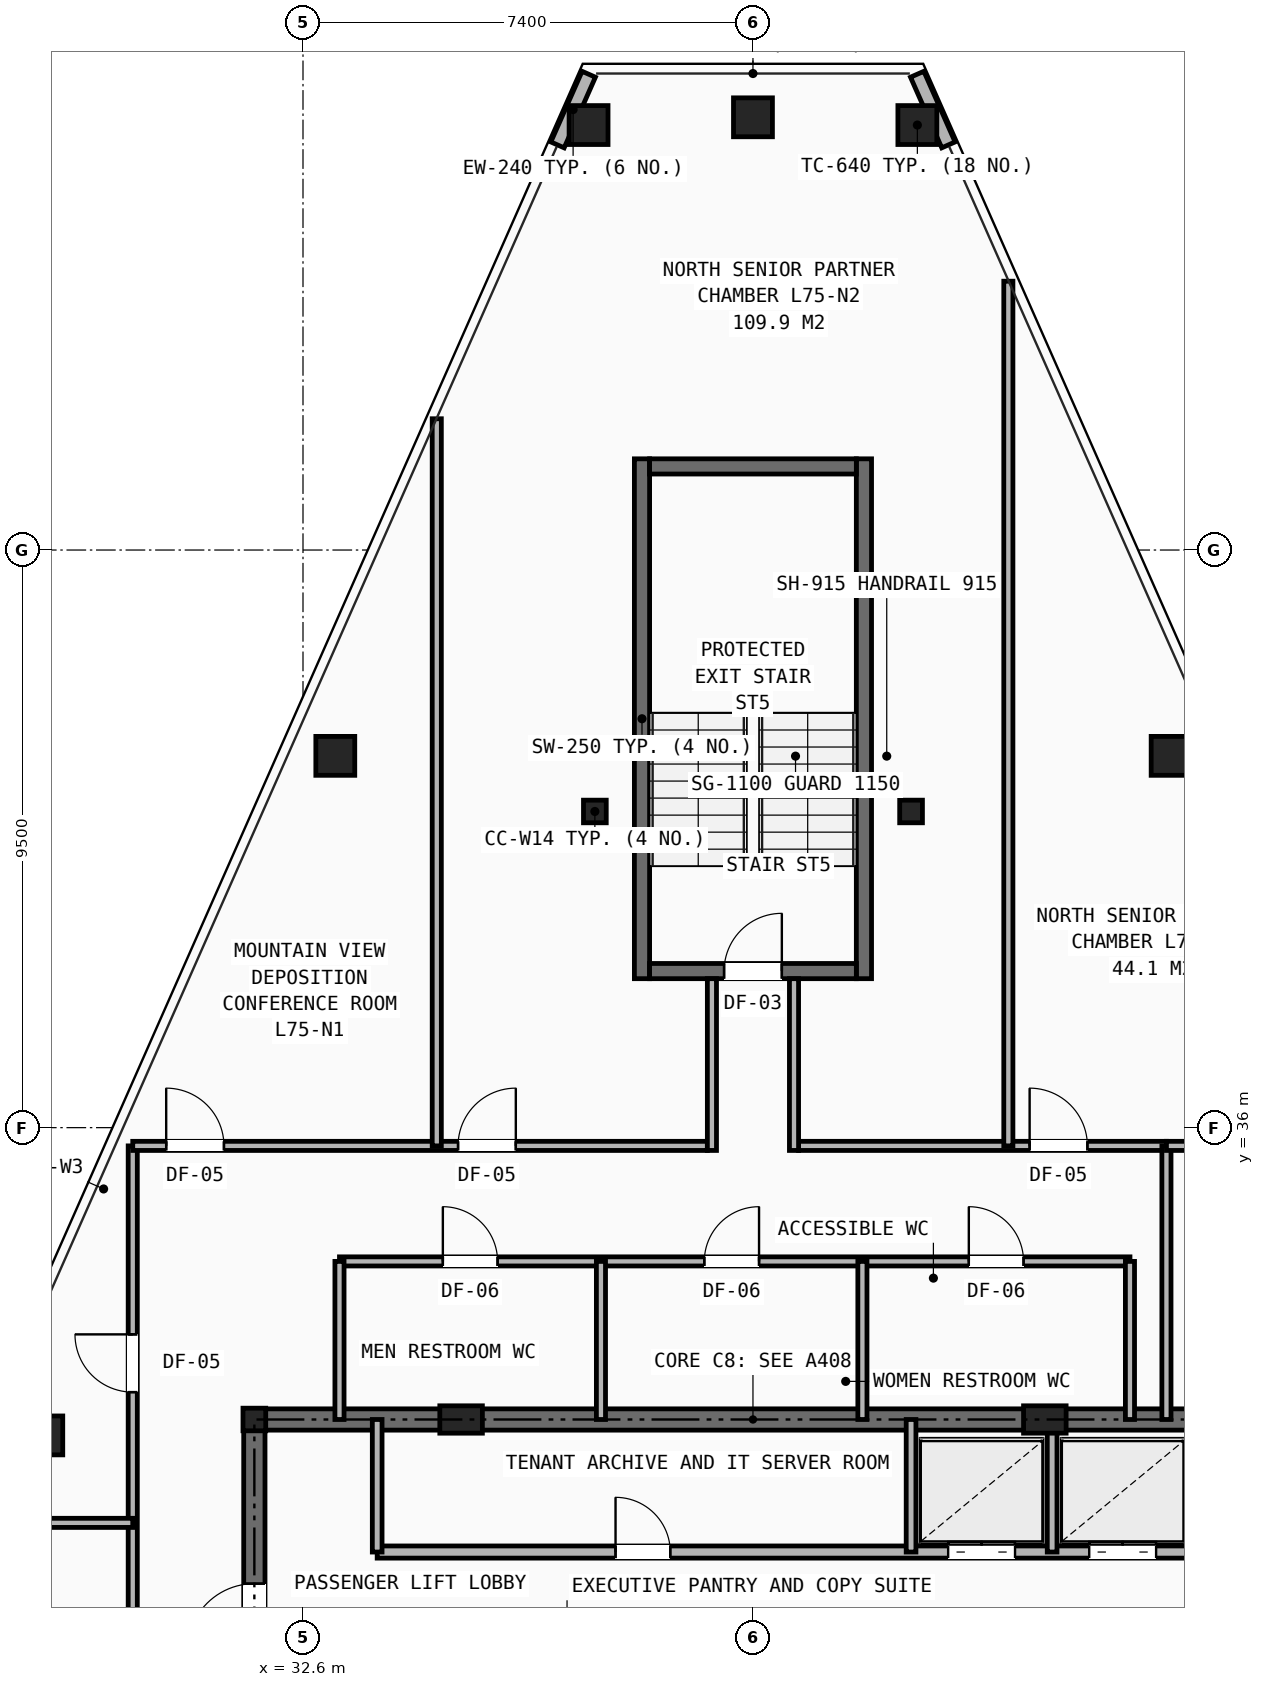
"""IFC4 building model, lengths in metres.
Left out: names, types, materials, properties, quantities, classifications, styles, units other than length and angle.
Written with IfcOpenShell. Run it as: python <this file> out.ifc"""

import sys

from ifc_helpers import new_model, si_unit, direction, frame, frame_2d, origin, origin_2d, place, context, subcontext, project, spatial, rectangle, hollow_rectangle, i_section, extrude, element, fill, save


model = new_model("IFC4")
c1 = context("Model", 3, precision=1e-05, world=origin(), true_north=direction((0.0, 1.0)))
c2 = subcontext(c1, "Body", "Model", "MODEL_VIEW")
j1 = project(units=[si_unit("LENGTHUNIT", "METRE"), si_unit("PLANEANGLEUNIT", "RADIAN")], contexts=[c1])
p1 = place(None, origin())
s1 = spatial("IfcSite", under=j1, at=p1, CompositionType="ELEMENT")
p2 = place(p1, origin())
s2 = spatial("IfcBuilding", under=s1, at=p2, CompositionType="ELEMENT")
p3 = place(p2, frame((0.0, 0.0, 265.5)))
s3 = spatial("IfcBuildingStorey", under=s2, at=p3, CompositionType="ELEMENT", Elevation=265.5)
for number, where, z_axis, x_axis in (
    (1, (31.8, 31.2, 0.0), (0.0, 0.0, 1.0), (1.0, 0.0, 0.0)),
    (2, (37.4, 41.2, 0.0), (0.0, 0.0, 1.0), (1.0, 0.0, 0.0)),
    (3, (42.6, 41.2, 0.0), (0.0, 0.0, 1.0), (1.0, 0.0, 0.0)),
):
    element("IfcColumn", number, at=place(p3, frame(where, z_axis=z_axis, x_axis=x_axis)), inside=s3, PredefinedType="COLUMN", context=c2, shape_type="SweptSolid", body=[
        extrude(i_section(OverallWidth=0.374, OverallDepth=0.372, WebThickness=0.016, FlangeThickness=0.026, at=origin_2d()), origin(), (0.0, 0.0, 1.0), 3.5),
    ])
for number, where, z_axis, x_axis in (
    (4, (35.2, 31.2, 0.0), (0.0, 0.0, 1.0), (1.0, 0.0, 0.0)),
    (5, (44.8, 31.2, 0.0), (0.0, 0.0, 1.0), (1.0, 0.0, 0.0)),
):
    element("IfcColumn", number, at=place(p3, frame(where, z_axis=z_axis, x_axis=x_axis)), inside=s3, PredefinedType="PILASTER", context=c2, shape_type="SweptSolid", body=[
        extrude(rectangle(XDim=0.7, YDim=0.45, at=origin_2d()), origin(), (0.0, 0.0, 1.0), 3.5),
    ])
for number, where, z_axis, x_axis in (
    (6, (42.704, 52.49, 0.0), (0.0, 0.0, 1.0), (1.0, 0.0, 0.0)),
    (7, (40.0, 52.617, 0.0), (0.0, 0.0, 1.0), (1.0, 0.0, 0.0)),
    (8, (37.296, 52.49, 0.0), (0.0, 0.0, 1.0), (1.0, 0.0, 0.0)),
    (9, (33.131, 42.115, 0.0), (0.0, 0.0, 1.0), (1.0, 0.0, 0.0)),
    (10, (28.329, 30.938, 0.0), (0.0, 0.0, 1.0), (1.0, 0.0, 0.0)),
    (11, (46.869, 42.115, 0.0), (0.0, 0.0, 1.0), (1.0, 0.0, 0.0)),
):
    element("IfcColumn", number, at=place(p3, frame(where, z_axis=z_axis, x_axis=x_axis)), inside=s3, PredefinedType="COLUMN", context=c2, shape_type="SweptSolid", body=[
        extrude(hollow_rectangle(XDim=0.64, YDim=0.64, WallThickness=0.045, at=origin_2d()), origin(), (0.0, 0.0, 1.0), 3.5),
    ])
for number, where, z_axis, x_axis in (
    (12, (37.299, 53.325, 0.0), (0.0, 0.0, 1.0), (-0.404, -0.915, 0.0)),
    (13, (43.215, 52.163, 0.0), (0.0, 0.0, 1.0), (-0.404, 0.915, 0.0)),
):
    element("IfcWall", number, at=place(p3, frame(where, z_axis=z_axis, x_axis=x_axis)), inside=s3, PredefinedType="SHEAR", context=c2, shape_type="SweptSolid", body=[
        extrude(rectangle(XDim=1.271, YDim=0.24, at=frame_2d((0.635, 0.0))), origin(), (0.0, 0.0, 1.0), 2.623),
    ])
p4 = place(p3, frame((31.8, 31.2, 0.0), z_axis=(0.0, 0.0, 1.0), x_axis=(1.0, 0.0, 0.0)))
e14 = element("IfcWall", 14, at=p4, inside=s3, PredefinedType="SHEAR", context=c2, shape_type="SweptSolid", body=[
    extrude(rectangle(XDim=16.4, YDim=0.35, at=frame_2d((8.2, 0.0))), origin(), (0.0, 0.0, 1.0), 3.25),
])
p5 = place(p3, frame((31.8, 16.4, 0.0), z_axis=(0.0, 0.0, 1.0), x_axis=(0.0, 1.0, 0.0)))
e15 = element("IfcWall", 15, at=p5, inside=s3, PredefinedType="SHEAR", context=c2, shape_type="SweptSolid", body=[
    extrude(rectangle(XDim=14.8, YDim=0.35, at=frame_2d((7.4, 0.0))), origin(), (0.0, 0.0, 1.0), 3.25),
])
p6 = place(p5, frame((11.0, 0.0, 0.0)))
e16 = element("IfcOpeningElement", 16, at=p6, cuts=e15, PredefinedType="OPENING", context=c2, shape_type="SweptSolid", body=[
    extrude(rectangle(XDim=1.1, YDim=2.15, at=frame_2d((0.55, 1.075))), frame((0.0, 0.185, 0.0), z_axis=(0.0, -1.0, 0.0), x_axis=(1.0, 0.0, 0.0)), (0.0, 0.0, 1.0), 0.37),
])
p7 = place(p3, frame((33.82, 29.02, 0.0), z_axis=(0.0, 0.0, 1.0), x_axis=(1.0, 0.0, 0.0)))
e17 = element("IfcWall", 17, at=p7, inside=s3, PredefinedType="SOLIDWALL", context=c2, shape_type="SweptSolid", body=[
    extrude(rectangle(XDim=14.38, YDim=0.2, at=frame_2d((7.19, 0.0))), origin(), (0.0, 0.0, 1.0), 2.705),
])
p8 = place(p7, frame((3.92, 0.0, 0.0)))
e18 = element("IfcOpeningElement", 18, at=p8, cuts=e17, PredefinedType="OPENING", context=c2, shape_type="SweptSolid", body=[
    extrude(rectangle(XDim=0.9, YDim=2.1, at=frame_2d((0.45, 1.05))), frame((0.0, 0.11, 0.0), z_axis=(0.0, -1.0, 0.0), x_axis=(1.0, 0.0, 0.0)), (0.0, 0.0, 1.0), 0.22),
])
p9 = place(p7, frame((9.39, 0.0, 0.0)))
e19 = element("IfcOpeningElement", 19, at=p9, cuts=e17, PredefinedType="OPENING", context=c2, shape_type="SweptSolid", body=[
    extrude(rectangle(XDim=1.1, YDim=2.15, at=frame_2d((0.55, 1.075))), frame((0.0, 0.11, 0.0), z_axis=(0.0, -1.0, 0.0), x_axis=(1.0, 0.0, 0.0)), (0.0, 0.0, 1.0), 0.22),
])
p10 = place(p7, frame((11.71, 0.0, 0.0)))
e20 = element("IfcOpeningElement", 20, at=p10, cuts=e17, PredefinedType="OPENING", context=c2, shape_type="SweptSolid", body=[
    extrude(rectangle(XDim=1.1, YDim=2.15, at=frame_2d((0.55, 1.075))), frame((0.0, 0.11, 0.0), z_axis=(0.0, -1.0, 0.0), x_axis=(1.0, 0.0, 0.0)), (0.0, 0.0, 1.0), 0.22),
])
for number, where, z_axis, x_axis in (
    (21, (33.82, 29.02, 0.0), (0.0, 0.0, 1.0), (0.0, 1.0, 0.0)),
    (22, (42.6, 29.02, 0.0), (0.0, 0.0, 1.0), (0.0, 1.0, 0.0)),
    (23, (44.92, 29.02, 0.0), (0.0, 0.0, 1.0), (0.0, 1.0, 0.0)),
):
    element("IfcWall", number, at=place(p3, frame(where, z_axis=z_axis, x_axis=x_axis)), inside=s3, PredefinedType="SOLIDWALL", context=c2, shape_type="SweptSolid", body=[
        extrude(rectangle(XDim=2.18, YDim=0.16, at=frame_2d((1.09, 0.0))), origin(), (0.0, 0.0, 1.0), 2.978),
    ])
p11 = place(p3, frame((33.2, 33.8, 0.0), z_axis=(0.0, 0.0, 1.0), x_axis=(1.0, 0.0, 0.0)))
e24 = element("IfcWall", 24, at=p11, inside=s3, PredefinedType="PARTITIONING", context=c2, shape_type="SweptSolid", body=[
    extrude(rectangle(XDim=13.0, YDim=0.15, at=frame_2d((6.5, 0.0))), origin(), (0.0, 0.0, 1.0), 3.25),
])
p12 = place(p11, frame((1.7, 0.0, 0.0)))
e25 = element("IfcOpeningElement", 25, at=p12, cuts=e24, PredefinedType="OPENING", context=c2, shape_type="SweptSolid", body=[
    extrude(rectangle(XDim=0.9, YDim=2.1, at=frame_2d((0.45, 1.05))), frame((0.0, 0.085, 0.0), z_axis=(0.0, -1.0, 0.0), x_axis=(1.0, 0.0, 0.0)), (0.0, 0.0, 1.0), 0.17),
])
p13 = place(p11, frame((6.0, 0.0, 0.0)))
e26 = element("IfcOpeningElement", 26, at=p13, cuts=e24, PredefinedType="OPENING", context=c2, shape_type="SweptSolid", body=[
    extrude(rectangle(XDim=0.9, YDim=2.1, at=frame_2d((0.45, 1.05))), frame((0.0, 0.085, 0.0), z_axis=(0.0, -1.0, 0.0), x_axis=(1.0, 0.0, 0.0)), (0.0, 0.0, 1.0), 0.17),
])
p14 = place(p11, frame((10.35, 0.0, 0.0)))
e27 = element("IfcOpeningElement", 27, at=p14, cuts=e24, PredefinedType="OPENING", context=c2, shape_type="SweptSolid", body=[
    extrude(rectangle(XDim=0.9, YDim=2.1, at=frame_2d((0.45, 1.05))), frame((0.0, 0.085, 0.0), z_axis=(0.0, -1.0, 0.0), x_axis=(1.0, 0.0, 0.0)), (0.0, 0.0, 1.0), 0.17),
])
for number, where, z_axis, x_axis in (
    (28, (33.2, 31.2, 0.0), (0.0, 0.0, 1.0), (0.0, 1.0, 0.0)),
    (29, (46.2, 31.2, 0.0), (0.0, 0.0, 1.0), (0.0, 1.0, 0.0)),
    (30, (37.5, 31.2, 0.0), (0.0, 0.0, 1.0), (0.0, 1.0, 0.0)),
    (31, (41.8, 31.2, 0.0), (0.0, 0.0, 1.0), (0.0, 1.0, 0.0)),
):
    element("IfcWall", number, at=place(p3, frame(where, z_axis=z_axis, x_axis=x_axis)), inside=s3, PredefinedType="PARTITIONING", context=c2, shape_type="SweptSolid", body=[
        extrude(rectangle(XDim=2.6, YDim=0.15, at=frame_2d((1.3, 0.0))), origin(), (0.0, 0.0, 1.0), 2.978),
    ])
p15 = place(p3, frame((29.8, 16.4, 0.0), z_axis=(0.0, 0.0, 1.0), x_axis=(0.0, 1.0, 0.0)))
e32 = element("IfcWall", 32, at=p15, inside=s3, PredefinedType="PARTITIONING", context=c2, shape_type="SweptSolid", body=[
    extrude(rectangle(XDim=19.3, YDim=0.15, at=frame_2d((9.65, 0.0))), origin(), (0.0, 0.0, 1.0), 2.292),
])
p16 = place(p15, frame((0.35, 0.0, 0.0)))
e33 = element("IfcOpeningElement", 33, at=p16, cuts=e32, PredefinedType="OPENING", context=c2, shape_type="SweptSolid", body=[
    extrude(rectangle(XDim=0.95, YDim=2.1, at=frame_2d((0.475, 1.05))), frame((0.0, 0.085, 0.0), z_axis=(0.0, -1.0, 0.0), x_axis=(1.0, 0.0, 0.0)), (0.0, 0.0, 1.0), 0.17),
])
p17 = place(p15, frame((7.45, 0.0, 0.0)))
e34 = element("IfcOpeningElement", 34, at=p17, cuts=e32, PredefinedType="OPENING", context=c2, shape_type="SweptSolid", body=[
    extrude(rectangle(XDim=0.95, YDim=2.1, at=frame_2d((0.475, 1.05))), frame((0.0, 0.085, 0.0), z_axis=(0.0, -1.0, 0.0), x_axis=(1.0, 0.0, 0.0)), (0.0, 0.0, 1.0), 0.17),
])
p18 = place(p15, frame((15.25, 0.0, 0.0)))
e35 = element("IfcOpeningElement", 35, at=p18, cuts=e32, PredefinedType="OPENING", context=c2, shape_type="SweptSolid", body=[
    extrude(rectangle(XDim=0.95, YDim=2.1, at=frame_2d((0.475, 1.05))), frame((0.0, 0.085, 0.0), z_axis=(0.0, -1.0, 0.0), x_axis=(1.0, 0.0, 0.0)), (0.0, 0.0, 1.0), 0.17),
])
p19 = place(p3, frame((29.8, 35.7, 0.0), z_axis=(0.0, 0.0, 1.0), x_axis=(1.0, 0.0, 0.0)))
e36 = element("IfcWall", 36, at=p19, inside=s3, PredefinedType="PARTITIONING", context=c2, shape_type="SweptSolid", body=[
    extrude(rectangle(XDim=9.45, YDim=0.15, at=frame_2d((4.725, 0.0))), origin(), (0.0, 0.0, 1.0), 2.628),
])
p20 = place(p19, frame((0.55, 0.0, 0.0)))
e37 = element("IfcOpeningElement", 37, at=p20, cuts=e36, PredefinedType="OPENING", context=c2, shape_type="SweptSolid", body=[
    extrude(rectangle(XDim=0.95, YDim=2.1, at=frame_2d((0.475, 1.05))), frame((0.0, 0.085, 0.0), z_axis=(0.0, -1.0, 0.0), x_axis=(1.0, 0.0, 0.0)), (0.0, 0.0, 1.0), 0.17),
])
p21 = place(p19, frame((5.35, 0.0, 0.0)))
e38 = element("IfcOpeningElement", 38, at=p21, cuts=e36, PredefinedType="OPENING", context=c2, shape_type="SweptSolid", body=[
    extrude(rectangle(XDim=0.95, YDim=2.1, at=frame_2d((0.475, 1.05))), frame((0.0, 0.085, 0.0), z_axis=(0.0, -1.0, 0.0), x_axis=(1.0, 0.0, 0.0)), (0.0, 0.0, 1.0), 0.17),
])
p22 = place(p3, frame((40.75, 35.7, 0.0), z_axis=(0.0, 0.0, 1.0), x_axis=(1.0, 0.0, 0.0)))
e39 = element("IfcWall", 39, at=p22, inside=s3, PredefinedType="PARTITIONING", context=c2, shape_type="SweptSolid", body=[
    extrude(rectangle(XDim=6.05, YDim=0.15, at=frame_2d((3.025, 0.0))), origin(), (0.0, 0.0, 1.0), 3.25),
])
p23 = place(p22, frame((3.8, 0.0, 0.0)))
e40 = element("IfcOpeningElement", 40, at=p23, cuts=e39, PredefinedType="OPENING", context=c2, shape_type="SweptSolid", body=[
    extrude(rectangle(XDim=0.95, YDim=2.1, at=frame_2d((0.475, 1.05))), frame((0.0, 0.085, 0.0), z_axis=(0.0, -1.0, 0.0), x_axis=(1.0, 0.0, 0.0)), (0.0, 0.0, 1.0), 0.17),
])
p24 = place(p3, frame((46.8, 31.2, 0.0), z_axis=(0.0, 0.0, 1.0), x_axis=(0.0, 1.0, 0.0)))
e41 = element("IfcWall", 41, at=p24, inside=s3, PredefinedType="PARTITIONING", context=c2, shape_type="SweptSolid", body=[
    extrude(rectangle(XDim=4.5, YDim=0.15, at=frame_2d((2.25, 0.0))), origin(), (0.0, 0.0, 1.0), 2.978),
])
p25 = place(p3, frame((26.236, 29.5, 0.0), z_axis=(0.0, 0.0, 1.0), x_axis=(1.0, 0.0, 0.0)))
e42 = element("IfcWall", 42, at=p25, inside=s3, PredefinedType="PARTITIONING", context=c2, shape_type="SweptSolid", body=[
    extrude(rectangle(XDim=3.564, YDim=0.15, at=frame_2d((1.782, 0.0))), origin(), (0.0, 0.0, 1.0), 2.628),
])
p26 = place(p3, frame((46.8, 35.7, 0.0), z_axis=(0.0, 0.0, 1.0), x_axis=(1.0, 0.0, 0.0)))
e43 = element("IfcWall", 43, at=p26, inside=s3, PredefinedType="PARTITIONING", context=c2, shape_type="SweptSolid", body=[
    extrude(rectangle(XDim=3.686, YDim=0.15, at=frame_2d((1.843, 0.0))), origin(), (0.0, 0.0, 1.0), 2.628),
])
p27 = place(p3, frame((34.8, 35.7, 0.0), z_axis=(0.0, 0.0, 1.0), x_axis=(0.0, 1.0, 0.0)))
e44 = element("IfcWall", 44, at=p27, inside=s3, PredefinedType="PARTITIONING", context=c2, shape_type="SweptSolid", body=[
    extrude(rectangle(XDim=11.959, YDim=0.15, at=frame_2d((5.979, 0.0))), origin(), (0.0, 0.0, 1.0), 2.292),
])
p28 = place(p3, frame((44.2, 35.7, 0.0), z_axis=(0.0, 0.0, 1.0), x_axis=(0.0, 1.0, 0.0)))
e45 = element("IfcWall", 45, at=p28, inside=s3, PredefinedType="PARTITIONING", context=c2, shape_type="SweptSolid", body=[
    extrude(rectangle(XDim=14.221, YDim=0.15, at=frame_2d((7.111, 0.0))), origin(), (0.0, 0.0, 1.0), 2.292),
])
for number, where, z_axis, x_axis in (
    (46, (38.175, 38.45, 0.0), (0.0, 0.0, 1.0), (0.0, 1.0, 0.0)),
    (47, (41.825, 38.45, 0.0), (0.0, 0.0, 1.0), (0.0, 1.0, 0.0)),
):
    element("IfcWall", number, at=place(p3, frame(where, z_axis=z_axis, x_axis=x_axis)), inside=s3, PredefinedType="SHEAR", context=c2, shape_type="SweptSolid", body=[
        extrude(rectangle(XDim=8.55, YDim=0.25, at=frame_2d((4.275, 0.0))), origin(), (0.0, 0.0, 1.0), 3.25),
    ])
p29 = place(p3, frame((38.3, 38.575, 0.0), z_axis=(0.0, 0.0, 1.0), x_axis=(1.0, 0.0, 0.0)))
e48 = element("IfcWall", 48, at=p29, inside=s3, PredefinedType="SHEAR", context=c2, shape_type="SweptSolid", body=[
    extrude(rectangle(XDim=3.4, YDim=0.25, at=frame_2d((1.7, 0.0))), origin(), (0.0, 0.0, 1.0), 3.25),
])
p30 = place(p29, frame((1.225, 0.0, 0.0)))
e49 = element("IfcOpeningElement", 49, at=p30, cuts=e48, PredefinedType="OPENING", context=c2, shape_type="SweptSolid", body=[
    extrude(rectangle(XDim=0.95, YDim=2.1, at=frame_2d((0.475, 1.05))), frame((0.0, 0.135, 0.0), z_axis=(0.0, -1.0, 0.0), x_axis=(1.0, 0.0, 0.0)), (0.0, 0.0, 1.0), 0.27),
])
p31 = place(p3, frame((38.3, 46.875, 0.0), z_axis=(0.0, 0.0, 1.0), x_axis=(1.0, 0.0, 0.0)))
e50 = element("IfcWall", 50, at=p31, inside=s3, PredefinedType="SHEAR", context=c2, shape_type="SweptSolid", body=[
    extrude(rectangle(XDim=3.4, YDim=0.25, at=frame_2d((1.7, 0.0))), origin(), (0.0, 0.0, 1.0), 3.25),
])
for number, where, z_axis, x_axis in (
    (51, (39.325, 35.625, 0.0), (0.0, 0.0, 1.0), (0.0, 1.0, 0.0)),
    (52, (40.675, 35.625, 0.0), (0.0, 0.0, 1.0), (0.0, 1.0, 0.0)),
):
    element("IfcWall", number, at=place(p3, frame(where, z_axis=z_axis, x_axis=x_axis)), inside=s3, PredefinedType="PARTITIONING", context=c2, shape_type="SweptSolid", body=[
        extrude(rectangle(XDim=2.825, YDim=0.15, at=frame_2d((1.413, 0.0))), origin(), (0.0, 0.0, 1.0), 3.25),
    ])
p32 = place(p6, origin())
e53 = element("IfcDoor", 53, at=p32, inside=s3, OperationType="SINGLE_SWING_LEFT", PredefinedType="DOOR", context=c2, shape_type="SweptSolid", body=[
    extrude(rectangle(XDim=1.1, YDim=2.15, at=frame_2d((0.55, 1.075))), frame((0.0, 0.025, 0.0), z_axis=(0.0, -1.0, 0.0), x_axis=(1.0, 0.0, 0.0)), (0.0, 0.0, 1.0), 0.05),
])
fill(e16, e53)
p33 = place(p8, origin())
e54 = element("IfcDoor", 54, at=p33, inside=s3, OperationType="SINGLE_SWING_LEFT", PredefinedType="DOOR", context=c2, shape_type="SweptSolid", body=[
    extrude(rectangle(XDim=0.9, YDim=2.1, at=frame_2d((0.45, 1.05))), frame((0.0, 0.025, 0.0), z_axis=(0.0, -1.0, 0.0), x_axis=(1.0, 0.0, 0.0)), (0.0, 0.0, 1.0), 0.05),
])
fill(e18, e54)
p34 = place(p9, origin())
e55 = element("IfcDoor", 55, at=p34, inside=s3, OperationType="DOUBLE_DOOR_SLIDING", PredefinedType="DOOR", context=c2, shape_type="SweptSolid", body=[
    extrude(rectangle(XDim=1.1, YDim=2.15, at=frame_2d((0.55, 1.075))), frame((0.0, 0.025, 0.0), z_axis=(0.0, -1.0, 0.0), x_axis=(1.0, 0.0, 0.0)), (0.0, 0.0, 1.0), 0.05),
])
fill(e19, e55)
p35 = place(p10, origin())
e56 = element("IfcDoor", 56, at=p35, inside=s3, OperationType="DOUBLE_DOOR_SLIDING", PredefinedType="DOOR", context=c2, shape_type="SweptSolid", body=[
    extrude(rectangle(XDim=1.1, YDim=2.15, at=frame_2d((0.55, 1.075))), frame((0.0, 0.025, 0.0), z_axis=(0.0, -1.0, 0.0), x_axis=(1.0, 0.0, 0.0)), (0.0, 0.0, 1.0), 0.05),
])
fill(e20, e56)
p36 = place(p12, origin())
e57 = element("IfcDoor", 57, at=p36, inside=s3, OperationType="SINGLE_SWING_LEFT", PredefinedType="DOOR", context=c2, shape_type="SweptSolid", body=[
    extrude(rectangle(XDim=0.9, YDim=2.1, at=frame_2d((0.45, 1.05))), frame((0.0, 0.025, 0.0), z_axis=(0.0, -1.0, 0.0), x_axis=(1.0, 0.0, 0.0)), (0.0, 0.0, 1.0), 0.05),
])
fill(e25, e57)
p37 = place(p13, origin())
e58 = element("IfcDoor", 58, at=p37, inside=s3, OperationType="SINGLE_SWING_RIGHT", PredefinedType="DOOR", context=c2, shape_type="SweptSolid", body=[
    extrude(rectangle(XDim=0.9, YDim=2.1, at=frame_2d((0.45, 1.05))), frame((0.0, 0.025, 0.0), z_axis=(0.0, -1.0, 0.0), x_axis=(1.0, 0.0, 0.0)), (0.0, 0.0, 1.0), 0.05),
])
fill(e26, e58)
p38 = place(p14, origin())
e59 = element("IfcDoor", 59, at=p38, inside=s3, OperationType="SINGLE_SWING_LEFT", PredefinedType="DOOR", context=c2, shape_type="SweptSolid", body=[
    extrude(rectangle(XDim=0.9, YDim=2.1, at=frame_2d((0.45, 1.05))), frame((0.0, 0.025, 0.0), z_axis=(0.0, -1.0, 0.0), x_axis=(1.0, 0.0, 0.0)), (0.0, 0.0, 1.0), 0.05),
])
fill(e27, e59)
p39 = place(p18, origin())
e60 = element("IfcDoor", 60, at=p39, inside=s3, OperationType="SINGLE_SWING_RIGHT", PredefinedType="DOOR", context=c2, shape_type="SweptSolid", body=[
    extrude(rectangle(XDim=0.95, YDim=2.1, at=frame_2d((0.475, 1.05))), frame((0.0, 0.025, 0.0), z_axis=(0.0, -1.0, 0.0), x_axis=(1.0, 0.0, 0.0)), (0.0, 0.0, 1.0), 0.05),
])
fill(e35, e60)
p40 = place(p20, origin())
e61 = element("IfcDoor", 61, at=p40, inside=s3, OperationType="SINGLE_SWING_LEFT", PredefinedType="DOOR", context=c2, shape_type="SweptSolid", body=[
    extrude(rectangle(XDim=0.95, YDim=2.1, at=frame_2d((0.475, 1.05))), frame((0.0, 0.025, 0.0), z_axis=(0.0, -1.0, 0.0), x_axis=(1.0, 0.0, 0.0)), (0.0, 0.0, 1.0), 0.05),
])
fill(e37, e61)
p41 = place(p21, origin())
e62 = element("IfcDoor", 62, at=p41, inside=s3, OperationType="SINGLE_SWING_RIGHT", PredefinedType="DOOR", context=c2, shape_type="SweptSolid", body=[
    extrude(rectangle(XDim=0.95, YDim=2.1, at=frame_2d((0.475, 1.05))), frame((0.0, 0.025, 0.0), z_axis=(0.0, -1.0, 0.0), x_axis=(1.0, 0.0, 0.0)), (0.0, 0.0, 1.0), 0.05),
])
fill(e38, e62)
p42 = place(p23, origin())
e63 = element("IfcDoor", 63, at=p42, inside=s3, OperationType="SINGLE_SWING_LEFT", PredefinedType="DOOR", context=c2, shape_type="SweptSolid", body=[
    extrude(rectangle(XDim=0.95, YDim=2.1, at=frame_2d((0.475, 1.05))), frame((0.0, 0.025, 0.0), z_axis=(0.0, -1.0, 0.0), x_axis=(1.0, 0.0, 0.0)), (0.0, 0.0, 1.0), 0.05),
])
fill(e40, e63)
p43 = place(p30, origin())
e64 = element("IfcDoor", 64, at=p43, inside=s3, OperationType="SINGLE_SWING_RIGHT", PredefinedType="DOOR", context=c2, shape_type="SweptSolid", body=[
    extrude(rectangle(XDim=0.95, YDim=2.1, at=frame_2d((0.475, 1.05))), frame((0.0, 0.025, 0.0), z_axis=(0.0, -1.0, 0.0), x_axis=(1.0, 0.0, 0.0)), (0.0, 0.0, 1.0), 0.05),
])
fill(e49, e64)
save(model, sys.argv[1])
